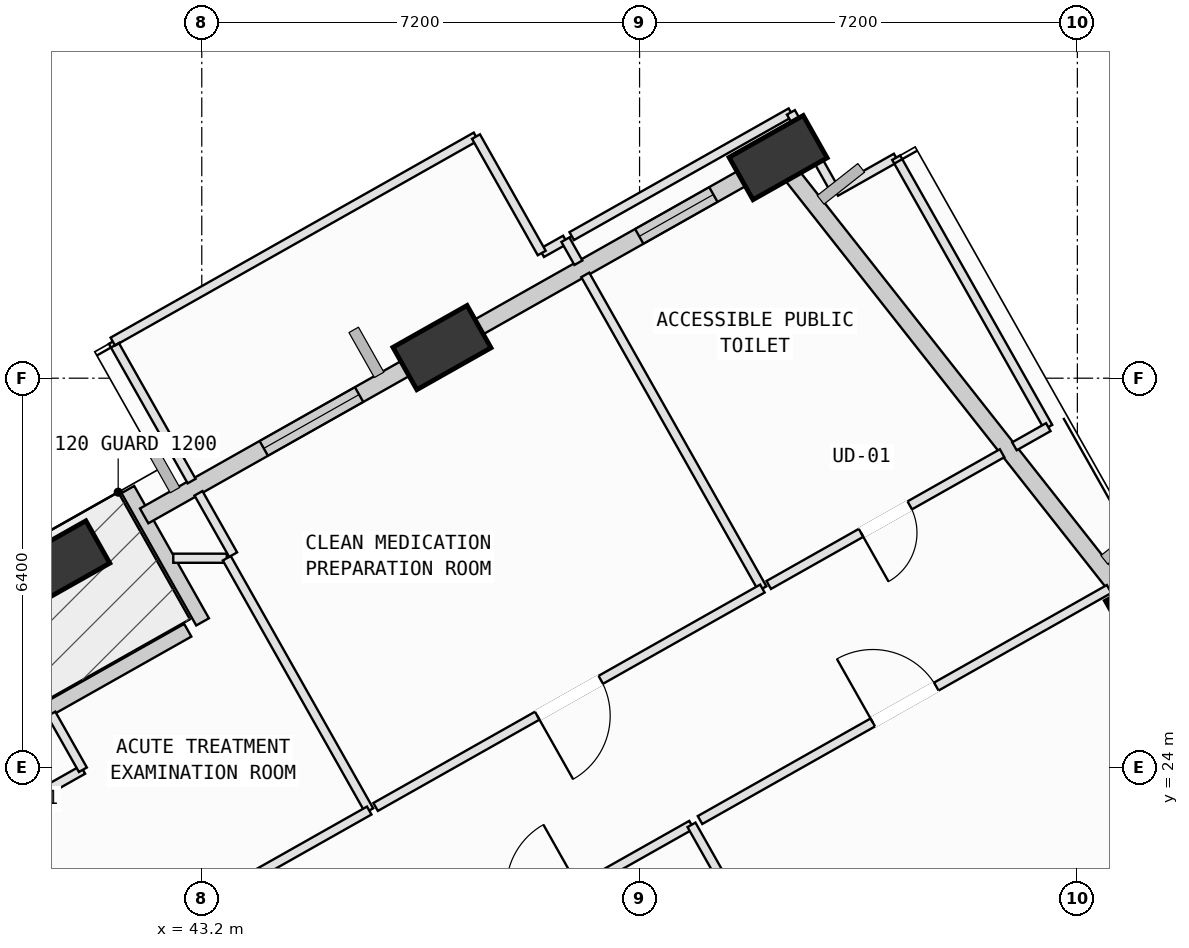
"""IFC4 building model, lengths in metres.
Left out: names, types, materials, properties, quantities, classifications, styles, units other than length and angle.
Written with IfcOpenShell. Run it as: python <this file> out.ifc"""

import sys

from ifc_helpers import new_model, si_unit, direction, frame, frame_2d, origin, origin_2d, place, context, subcontext, project, spatial, rectangle, extrude, element, fill, save


model = new_model("IFC4")
c1 = context("Model", 3, precision=1e-05, world=origin(), true_north=direction((0.0, 1.0)))
c2 = subcontext(c1, "Body", "Model", "MODEL_VIEW")
j1 = project(units=[si_unit("LENGTHUNIT", "METRE"), si_unit("PLANEANGLEUNIT", "RADIAN")], contexts=[c1])
p1 = place(None, origin())
s1 = spatial("IfcSite", under=j1, at=p1, CompositionType="ELEMENT")
p2 = place(p1, origin())
s2 = spatial("IfcBuilding", under=s1, at=p2, CompositionType="ELEMENT")
p3 = place(p2, frame((0.0, 0.0, 149.8)))
s3 = spatial("IfcBuildingStorey", under=s2, at=p3, CompositionType="ELEMENT", Elevation=149.8)
p4 = place(p3, frame((58.756, 26.323, 0.086), z_axis=(-0.007138333207, 0.103661012665, 0.994587069417), x_axis=(0.550000990566, -0.830248298893, 0.090480232982)))
e1 = element("IfcColumn", 1, at=p4, inside=s3, PredefinedType="COLUMN", context=c2, shape_type="SweptSolid", body=[
    extrude(rectangle(XDim=1.4, YDim=0.8, at=origin_2d()), origin(), (0.0, 0.0, 1.0), 3.933),
])
p5 = place(p3, frame((52.678, 34.028, 0.063), z_axis=(-0.038751282156, 0.078491432755, 0.996161348937), x_axis=(-0.563992536618, -0.8246575779, 0.043038330033)))
e2 = element("IfcColumn", 2, at=p5, inside=s3, PredefinedType="COLUMN", context=c2, shape_type="SweptSolid", body=[
    extrude(rectangle(XDim=1.4, YDim=0.8, at=origin_2d()), origin(), (0.0, 0.0, 1.0), 3.95),
])
p6 = place(p3, frame((47.15, 30.904, 0.045), z_axis=(-0.025704742237, 0.055847713349, 0.99810836042), x_axis=(-0.585842497961, -0.809861029984, 0.030227135099)))
e3 = element("IfcColumn", 3, at=p6, inside=s3, PredefinedType="COLUMN", context=c2, shape_type="SweptSolid", body=[
    extrude(rectangle(XDim=1.4, YDim=0.8, at=origin_2d()), origin(), (0.0, 0.0, 1.0), 3.961),
])
p7 = place(p3, frame((40.881, 27.362, 0.025), z_axis=(-0.01080860271, 0.030092132545, 0.999488688113), x_axis=(-0.653407021081, -0.756843527914, 0.015720657018)))
e4 = element("IfcColumn", 4, at=p7, inside=s3, PredefinedType="COLUMN", context=c2, shape_type="SweptSolid", body=[
    extrude(rectangle(XDim=1.4, YDim=0.8, at=origin_2d()), origin(), (0.0, 0.0, 1.0), 3.975),
])
p8 = place(p3, frame((36.909, 22.833, 0.0), z_axis=(0.0, 0.0, 1.0), x_axis=(0.870780952781, 0.491671162744, 0.0)))
e5 = element("IfcWall", 5, at=p8, inside=s3, PredefinedType="SOLIDWALL", context=c2, shape_type="SweptSolid", body=[
    extrude(rectangle(XDim=6.96, YDim=0.24, at=frame_2d((3.48, 0.0))), origin(), (0.0, 0.0, 1.0), 3.165),
])
p9 = place(p8, frame((2.93, 0.0, 0.0)))
e6 = element("IfcOpeningElement", 6, at=p9, cuts=e5, PredefinedType="OPENING", context=c2, shape_type="SweptSolid", body=[
    extrude(rectangle(XDim=1.1, YDim=2.15, at=frame_2d((0.55, 1.075))), frame((0.0, 0.13, 0.0), z_axis=(0.0, -1.0, 0.0), x_axis=(1.0, 0.0, 0.0)), (0.0, 0.0, 1.0), 0.26),
])
p10 = place(p3, frame((43.213, 26.392, 0.0), z_axis=(0.0, 0.0, 1.0), x_axis=(-0.491725759478, 0.870750123437, 0.0)))
e7 = element("IfcWall", 7, at=p10, inside=s3, PredefinedType="SOLIDWALL", context=c2, shape_type="SweptSolid", body=[
    extrude(rectangle(XDim=2.5, YDim=0.24, at=frame_2d((1.25, 0.0))), origin(), (0.0, 0.0, 1.0), 3.165),
])
p11 = place(p3, frame((52.881, 33.769, 0.0), z_axis=(0.0, 0.0, 1.0), x_axis=(0.618971390847, -0.785413532677, 0.0)))
e8 = element("IfcWall", 8, at=p11, inside=s3, PredefinedType="SOLIDWALL", context=c2, shape_type="SweptSolid", body=[
    extrude(rectangle(XDim=8.838, YDim=0.28, at=frame_2d((4.419, 0.0))), origin(), (0.0, 0.0, 1.0), 3.165),
])
p12 = place(p3, frame((47.579, 31.143, 0.0), z_axis=(0.0, 0.0, 1.0), x_axis=(0.870789061842, 0.491656800803, 0.0)))
e9 = element("IfcWall", 9, at=p12, inside=s3, PredefinedType="SOLIDWALL", context=c2, shape_type="SweptSolid", body=[
    extrude(rectangle(XDim=5.405, YDim=0.28, at=frame_2d((2.702, 0.0))), origin(), (0.0, 0.0, 1.0), 2.765),
])
p13 = place(p12, frame((3.234, 0.0, 0.75)))
e10 = element("IfcOpeningElement", 10, at=p13, cuts=e9, PredefinedType="OPENING", context=c2, shape_type="SweptSolid", body=[
    extrude(rectangle(XDim=1.4, YDim=1.85, at=frame_2d((0.7, 0.925))), frame((0.0, 0.15, 0.0), z_axis=(0.0, -1.0, 0.0), x_axis=(1.0, 0.0, 0.0)), (0.0, 0.0, 1.0), 0.3),
])
p14 = place(p3, frame((42.252, 28.135, 0.0), z_axis=(0.0, 0.0, 1.0), x_axis=(0.8708017473, 0.491634332507, 0.0)))
e11 = element("IfcWall", 11, at=p14, inside=s3, PredefinedType="SOLIDWALL", context=c2, shape_type="SweptSolid", body=[
    extrude(rectangle(XDim=5.156, YDim=0.28, at=frame_2d((2.578, 0.0))), origin(), (0.0, 0.0, 1.0), 3.145),
])
p15 = place(p14, frame((2.26, 0.0, 0.75)))
e12 = element("IfcOpeningElement", 12, at=p15, cuts=e11, PredefinedType="OPENING", context=c2, shape_type="SweptSolid", body=[
    extrude(rectangle(XDim=1.8, YDim=2.05, at=frame_2d((0.9, 1.025))), frame((0.0, 0.15, 0.0), z_axis=(0.0, -1.0, 0.0), x_axis=(1.0, 0.0, 0.0)), (0.0, 0.0, 1.0), 0.3),
])
p16 = place(p3, frame((46.517, 20.38, 0.0), z_axis=(0.0, 0.0, 1.0), x_axis=(0.870819350586, 0.491603151581, 0.0)))
e13 = element("IfcWall", 13, at=p16, inside=s3, PredefinedType="PARTITIONING", context=c2, shape_type="SweptSolid", body=[
    extrude(rectangle(XDim=5.439, YDim=0.15, at=frame_2d((2.72, 0.0))), origin(), (0.0, 0.0, 1.0), 2.765),
])
p17 = place(p16, frame((2.12, 0.0, 0.0)))
e14 = element("IfcOpeningElement", 14, at=p17, cuts=e13, PredefinedType="OPENING", context=c2, shape_type="SweptSolid", body=[
    extrude(rectangle(XDim=1.2, YDim=2.15, at=frame_2d((0.6, 1.075))), frame((0.0, 0.085, 0.0), z_axis=(0.0, -1.0, 0.0), x_axis=(1.0, 0.0, 0.0)), (0.0, 0.0, 1.0), 0.17),
])
p18 = place(p3, frame((51.254, 23.054, 0.0), z_axis=(0.0, 0.0, 1.0), x_axis=(0.49170871252, -0.870759749892, 0.0)))
e15 = element("IfcWall", 15, at=p18, inside=s3, PredefinedType="PARTITIONING", context=c2, shape_type="SweptSolid", body=[
    extrude(rectangle(XDim=11.934, YDim=0.15, at=frame_2d((5.967, 0.0))), origin(), (0.0, 0.0, 1.0), 3.78),
])
p19 = place(p3, frame((51.394, 23.133, 0.0), z_axis=(0.0, 0.0, 1.0), x_axis=(0.870715207894, 0.491787582948, 0.0)))
e16 = element("IfcWall", 16, at=p19, inside=s3, PredefinedType="PARTITIONING", context=c2, shape_type="SweptSolid", body=[
    extrude(rectangle(XDim=7.727, YDim=0.15, at=frame_2d((3.864, 0.0))), origin(), (0.0, 0.0, 1.0), 2.765),
])
p20 = place(p19, frame((3.263, 0.0, 0.0)))
e17 = element("IfcOpeningElement", 17, at=p20, cuts=e16, PredefinedType="OPENING", context=c2, shape_type="SweptSolid", body=[
    extrude(rectangle(XDim=1.2, YDim=2.15, at=frame_2d((0.6, 1.075))), frame((0.0, 0.085, 0.0), z_axis=(0.0, -1.0, 0.0), x_axis=(1.0, 0.0, 0.0)), (0.0, 0.0, 1.0), 0.17),
])
p21 = place(p3, frame((39.764, 23.124, 0.0), z_axis=(0.0, 0.0, 1.0), x_axis=(0.870880797737, 0.491494289014, 0.0)))
e18 = element("IfcWall", 18, at=p21, inside=s3, PredefinedType="PARTITIONING", context=c2, shape_type="SweptSolid", body=[
    extrude(rectangle(XDim=1.701, YDim=0.15, at=frame_2d((0.851, 0.0))), origin(), (0.0, 0.0, 1.0), 3.415),
])
p22 = place(p3, frame((41.245, 23.96, 0.0), z_axis=(0.0, 0.0, 1.0), x_axis=(-0.491798070735, 0.870709284217, 0.0)))
e19 = element("IfcWall", 19, at=p22, inside=s3, PredefinedType="PARTITIONING", context=c2, shape_type="SweptSolid", body=[
    extrude(rectangle(XDim=1.055, YDim=0.15, at=frame_2d((0.528, 0.0))), origin(), (0.0, 0.0, 1.0), 3.78),
])
p23 = place(p3, frame((42.731, 27.439, 0.0), z_axis=(0.0, 0.0, 1.0), x_axis=(1.0, 0.0, 0.0)))
e20 = element("IfcWall", 20, at=p23, inside=s3, PredefinedType="PARTITIONING", context=c2, shape_type="SweptSolid", body=[
    extrude(rectangle(XDim=0.88, YDim=0.15, at=frame_2d((0.44, 0.0))), origin(), (0.0, 0.0, 1.0), 3.78),
])
p24 = place(p3, frame((43.611, 27.439, 0.0), z_axis=(0.0, 0.0, 1.0), x_axis=(0.491647001165, -0.87079459475, 0.0)))
e21 = element("IfcWall", 21, at=p24, inside=s3, PredefinedType="PARTITIONING", context=c2, shape_type="SweptSolid", body=[
    extrude(rectangle(XDim=4.766, YDim=0.15, at=frame_2d((2.383, 0.0))), origin(), (0.0, 0.0, 1.0), 3.415),
])
p25 = place(p3, frame((45.954, 23.289, 0.0), z_axis=(0.0, 0.0, 1.0), x_axis=(-0.870735432675, -0.491751773037, 0.0)))
e22 = element("IfcWall", 22, at=p25, inside=s3, PredefinedType="PARTITIONING", context=c2, shape_type="SweptSolid", body=[
    extrude(rectangle(XDim=5.426, YDim=0.15, at=frame_2d((2.713, 0.0))), origin(), (0.0, 0.0, 1.0), 3.78),
])
p26 = place(p3, frame((48.791, 32.459, 0.0), z_axis=(0.0, 0.0, 1.0), x_axis=(0.871356329131, 0.490650739002, 0.0)))
e23 = element("IfcWall", 23, at=p26, inside=s3, PredefinedType="PARTITIONING", context=c2, shape_type="SweptSolid", body=[
    extrude(rectangle(XDim=0.446, YDim=0.15, at=frame_2d((0.223, 0.0))), origin(), (0.0, 0.0, 1.0), 3.165),
])
p27 = place(p3, frame((49.18, 32.678, 0.0), z_axis=(0.0, 0.0, 1.0), x_axis=(0.491964831571, -0.870615072519, 0.0)))
e24 = element("IfcWall", 24, at=p27, inside=s3, PredefinedType="PARTITIONING", context=c2, shape_type="SweptSolid", body=[
    extrude(rectangle(XDim=0.435, YDim=0.15, at=frame_2d((0.218, 0.0))), origin(), (0.0, 0.0, 1.0), 3.78),
])
p28 = place(p3, frame((49.507, 32.099, 0.0), z_axis=(0.0, 0.0, 1.0), x_axis=(0.491645776878, -0.870795285976, 0.0)))
e25 = element("IfcWall", 25, at=p28, inside=s3, PredefinedType="PARTITIONING", context=c2, shape_type="SweptSolid", body=[
    extrude(rectangle(XDim=5.925, YDim=0.15, at=frame_2d((2.962, 0.0))), origin(), (0.0, 0.0, 1.0), 3.78),
])
p29 = place(p3, frame((52.42, 26.94, 0.0), z_axis=(0.0, 0.0, 1.0), x_axis=(-0.870751378519, -0.491723536967, 0.0)))
e26 = element("IfcWall", 26, at=p29, inside=s3, PredefinedType="PARTITIONING", context=c2, shape_type="SweptSolid", body=[
    extrude(rectangle(XDim=7.305, YDim=0.15, at=frame_2d((3.652, 0.0))), origin(), (0.0, 0.0, 1.0), 3.78),
])
p30 = place(p29, frame((3.052, 0.0, 0.0)))
e27 = element("IfcOpeningElement", 27, at=p30, cuts=e26, PredefinedType="OPENING", context=c2, shape_type="SweptSolid", body=[
    extrude(rectangle(XDim=1.2, YDim=2.15, at=frame_2d((0.6, 1.075))), frame((0.0, 0.085, 0.0), z_axis=(0.0, -1.0, 0.0), x_axis=(1.0, 0.0, 0.0)), (0.0, 0.0, 1.0), 0.17),
])
p31 = place(p3, frame((43.716, 27.498, 0.0), z_axis=(0.0, 0.0, 1.0), x_axis=(-0.491890651363, 0.870656985903, 0.0)))
e28 = element("IfcWall", 28, at=p31, inside=s3, PredefinedType="PARTITIONING", context=c2, shape_type="SweptSolid", body=[
    extrude(rectangle(XDim=1.159, YDim=0.15, at=frame_2d((0.58, 0.0))), origin(), (0.0, 0.0, 1.0), 3.78),
])
p32 = place(p3, frame((43.033, 28.708, 0.0), z_axis=(0.0, 0.0, 1.0), x_axis=(-0.491861826259, 0.870673270446, 0.0)))
e29 = element("IfcWall", 29, at=p32, inside=s3, PredefinedType="PARTITIONING", context=c2, shape_type="SweptSolid", body=[
    extrude(rectangle(XDim=2.635, YDim=0.15, at=frame_2d((1.317, 0.0))), origin(), (0.0, 0.0, 1.0), 3.78),
])
p33 = place(p3, frame((41.737, 31.002, 0.0), z_axis=(0.0, 0.0, 1.0), x_axis=(0.870807350692, 0.491624407429, 0.0)))
e30 = element("IfcWall", 30, at=p33, inside=s3, PredefinedType="PARTITIONING", context=c2, shape_type="SweptSolid", body=[
    extrude(rectangle(XDim=6.859, YDim=0.15, at=frame_2d((3.43, 0.0))), origin(), (0.0, 0.0, 1.0), 3.78),
])
p34 = place(p3, frame((47.71, 34.374, 0.0), z_axis=(0.0, 0.0, 1.0), x_axis=(0.491588936477, -0.870827375278, 0.0)))
e31 = element("IfcWall", 31, at=p34, inside=s3, PredefinedType="PARTITIONING", context=c2, shape_type="SweptSolid", body=[
    extrude(rectangle(XDim=2.199, YDim=0.15, at=frame_2d((1.1, 0.0))), origin(), (0.0, 0.0, 1.0), 3.78),
])
p35 = place(p3, frame((53.627, 33.466, 0.0), z_axis=(0.0, 0.0, 1.0), x_axis=(0.870682401121, 0.49184566317, 0.0)))
e32 = element("IfcWall", 32, at=p35, inside=s3, PredefinedType="PARTITIONING", context=c2, shape_type="SweptSolid", body=[
    extrude(rectangle(XDim=1.141, YDim=0.15, at=frame_2d((0.57, 0.0))), origin(), (0.0, 0.0, 1.0), 3.78),
])
p36 = place(p3, frame((54.62, 34.027, 0.0), z_axis=(0.0, 0.0, 1.0), x_axis=(0.491586153955, -0.870828946028, 0.0)))
e33 = element("IfcWall", 33, at=p36, inside=s3, PredefinedType="PARTITIONING", context=c2, shape_type="SweptSolid", body=[
    extrude(rectangle(XDim=5.09, YDim=0.15, at=frame_2d((2.545, 0.0))), origin(), (0.0, 0.0, 1.0), 3.78),
])
p37 = place(p3, frame((57.122, 29.595, 0.0), z_axis=(0.0, 0.0, 1.0), x_axis=(-0.870534417651, -0.492107536709, 0.0)))
e34 = element("IfcWall", 34, at=p37, inside=s3, PredefinedType="PARTITIONING", context=c2, shape_type="SweptSolid", body=[
    extrude(rectangle(XDim=0.64, YDim=0.15, at=frame_2d((0.32, 0.0))), origin(), (0.0, 0.0, 1.0), 3.78),
])
p38 = place(p3, frame((56.362, 29.166, 0.0), z_axis=(0.0, 0.0, 1.0), x_axis=(-0.870794858424, -0.49164653415, 0.0)))
e35 = element("IfcWall", 35, at=p38, inside=s3, PredefinedType="PARTITIONING", context=c2, shape_type="SweptSolid", body=[
    extrude(rectangle(XDim=4.408, YDim=0.15, at=frame_2d((2.204, 0.0))), origin(), (0.0, 0.0, 1.0), 3.78),
])
p39 = place(p38, frame((1.744, 0.0, 0.0)))
e36 = element("IfcOpeningElement", 36, at=p39, cuts=e35, PredefinedType="OPENING", context=c2, shape_type="SweptSolid", body=[
    extrude(rectangle(XDim=0.92, YDim=2.1, at=frame_2d((0.46, 1.05))), frame((0.0, 0.085, 0.0), z_axis=(0.0, -1.0, 0.0), x_axis=(1.0, 0.0, 0.0)), (0.0, 0.0, 1.0), 0.17),
])
p40 = place(p3, frame((49.284, 32.737, 0.0), z_axis=(0.0, 0.0, 1.0), x_axis=(0.870840597135, 0.491565513824, 0.0)))
e37 = element("IfcWall", 37, at=p40, inside=s3, PredefinedType="PARTITIONING", context=c2, shape_type="SweptSolid", body=[
    extrude(rectangle(XDim=4.14, YDim=0.15, at=frame_2d((2.07, 0.0))), origin(), (0.0, 0.0, 1.0), 2.765),
])
p41 = place(p3, frame((52.889, 34.772, 0.0), z_axis=(0.0, 0.0, 1.0), x_axis=(0.492014351651, -0.870587087987, 0.0)))
e38 = element("IfcWall", 38, at=p41, inside=s3, PredefinedType="PARTITIONING", context=c2, shape_type="SweptSolid", body=[
    extrude(rectangle(XDim=1.5, YDim=0.15, at=frame_2d((0.75, 0.0))), origin(), (0.0, 0.0, 1.0), 3.165),
])
p42 = place(p13, origin())
e39 = element("IfcWindow", 39, at=p42, inside=s3, PartitioningType="SINGLE_PANEL", PredefinedType="WINDOW", context=c2, shape_type="SweptSolid", body=[
    extrude(rectangle(XDim=1.4, YDim=1.85, at=frame_2d((0.7, 0.925))), frame((0.0, 0.03, 0.0), z_axis=(0.0, -1.0, 0.0), x_axis=(1.0, 0.0, 0.0)), (0.0, 0.0, 1.0), 0.06),
])
fill(e10, e39)
p43 = place(p15, origin())
e40 = element("IfcWindow", 40, at=p43, inside=s3, PartitioningType="SINGLE_PANEL", PredefinedType="WINDOW", context=c2, shape_type="SweptSolid", body=[
    extrude(rectangle(XDim=1.8, YDim=2.05, at=frame_2d((0.9, 1.025))), frame((0.0, 0.03, 0.0), z_axis=(0.0, -1.0, 0.0), x_axis=(1.0, 0.0, 0.0)), (0.0, 0.0, 1.0), 0.06),
])
fill(e12, e40)
p44 = place(p20, origin())
e41 = element("IfcDoor", 41, at=p44, inside=s3, OperationType="SINGLE_SWING_LEFT", PredefinedType="DOOR", context=c2, shape_type="SweptSolid", body=[
    extrude(rectangle(XDim=1.2, YDim=2.15, at=frame_2d((0.6, 1.075))), frame((0.0, 0.025, 0.0), z_axis=(0.0, -1.0, 0.0), x_axis=(1.0, 0.0, 0.0)), (0.0, 0.0, 1.0), 0.05),
])
fill(e17, e41)
p45 = place(p30, origin())
e42 = element("IfcDoor", 42, at=p45, inside=s3, OperationType="SINGLE_SWING_RIGHT", PredefinedType="DOOR", context=c2, shape_type="SweptSolid", body=[
    extrude(rectangle(XDim=1.2, YDim=2.15, at=frame_2d((0.6, 1.075))), frame((0.0, 0.025, 0.0), z_axis=(0.0, -1.0, 0.0), x_axis=(1.0, 0.0, 0.0)), (0.0, 0.0, 1.0), 0.05),
])
fill(e27, e42)
p46 = place(p39, origin())
e43 = element("IfcDoor", 43, at=p46, inside=s3, OperationType="SINGLE_SWING_RIGHT", PredefinedType="DOOR", context=c2, shape_type="SweptSolid", body=[
    extrude(rectangle(XDim=0.92, YDim=2.1, at=frame_2d((0.46, 1.05))), frame((0.0, 0.025, 0.0), z_axis=(0.0, -1.0, 0.0), x_axis=(1.0, 0.0, 0.0)), (0.0, 0.0, 1.0), 0.05),
])
fill(e36, e43)
save(model, sys.argv[1])
